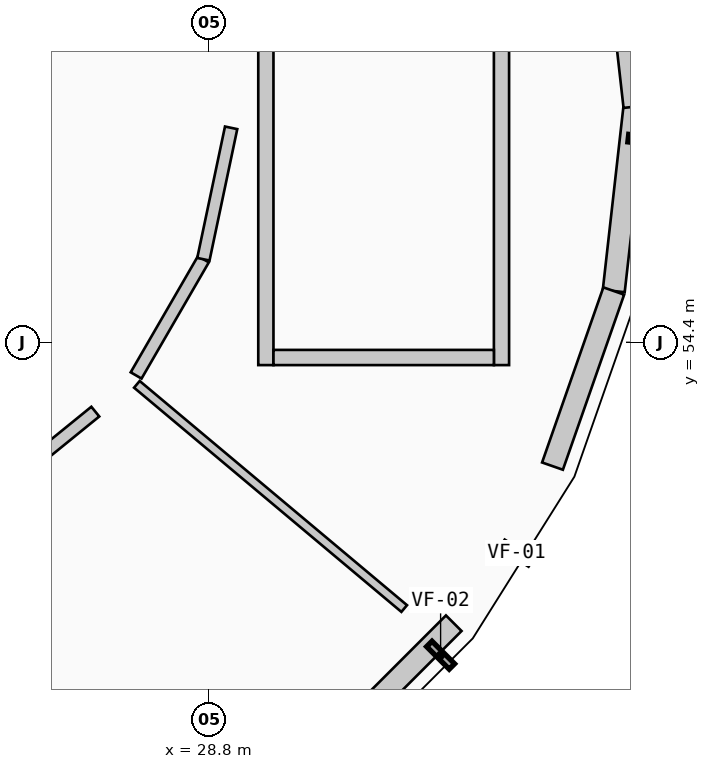
"""IFC4 building model, lengths in metres.
Left out: names, types, materials, properties, quantities, classifications, styles, units other than length and angle.
Written with IfcOpenShell. Run it as: python <this file> out.ifc"""

import sys

from ifc_helpers import new_model, si_unit, direction, frame, frame_2d, origin, origin_2d, place, context, subcontext, project, spatial, rectangle, extrude, element, fill, save


model = new_model("IFC4")
c1 = context("Model", 3, precision=1e-05, world=origin(), true_north=direction((0.0, 1.0)))
c2 = subcontext(c1, "Body", "Model", "MODEL_VIEW")
j1 = project(units=[si_unit("LENGTHUNIT", "METRE"), si_unit("PLANEANGLEUNIT", "RADIAN")], contexts=[c1])
p1 = place(None, origin())
s1 = spatial("IfcSite", under=j1, at=p1, CompositionType="ELEMENT")
p2 = place(p1, origin())
s2 = spatial("IfcBuilding", under=s1, at=p2, CompositionType="ELEMENT")
p3 = place(p2, frame((0.0, 0.0, 4.55)))
s3 = spatial("IfcBuildingStorey", under=s2, at=p3, CompositionType="ELEMENT", Elevation=4.55)
for number, where, z_axis, x_axis in (
    (1, (33.88, 57.5, 0.0), (0.0, 0.0, 1.0), (1.0, 0.0, 0.0)),
    (2, (32.852, 52.996, 0.0), (0.0, 0.0, 1.0), (1.0, 0.0, 0.0)),
    (3, (27.46, 53.54, 0.0), (0.0, 0.0, 1.0), (1.0, 0.0, 0.0)),
):
    element("IfcColumn", number, at=place(p3, frame(where, z_axis=z_axis, x_axis=x_axis)), inside=s3, PredefinedType="COLUMN", context=c2, shape_type="SweptSolid", body=[
        extrude(rectangle(XDim=0.315, YDim=0.315, at=origin_2d()), origin(), (0.0, 0.0, 1.0), 4.2),
    ])
p4 = place(p3, frame((34.4, 57.5, 0.0), z_axis=(0.0, 0.0, 1.0), x_axis=(-0.111847873866, -0.993725340882, 0.0)))
e4 = element("IfcWall", 4, at=p4, inside=s3, PredefinedType="ELEMENTEDWALL", context=c2, shape_type="SweptSolid", body=[
    extrude(rectangle(XDim=2.44, YDim=0.29, at=frame_2d((1.22, 0.0))), origin(), (0.0, 0.0, 1.0), 3.314),
])
p5 = place(p3, frame((34.127, 55.075, 0.0), z_axis=(0.0, 0.0, 1.0), x_axis=(-0.330176659411, -0.943919156274, 0.0)))
e5 = element("IfcWall", 5, at=p5, inside=s3, PredefinedType="ELEMENTEDWALL", context=c2, shape_type="SweptSolid", body=[
    extrude(rectangle(XDim=2.441, YDim=0.29, at=frame_2d((1.22, 0.0))), origin(), (0.0, 0.0, 1.0), 3.314),
])
p6 = place(p5, frame((0.71, 0.0, 0.85)))
e6 = element("IfcOpeningElement", 6, at=p6, cuts=e5, PredefinedType="OPENING", context=c2, shape_type="SweptSolid", body=[
    extrude(rectangle(XDim=1.02, YDim=1.6, at=frame_2d((0.51, 0.8))), frame((0.0, 0.155, 0.0), z_axis=(0.0, -1.0, 0.0), x_axis=(1.0, 0.0, 0.0)), (0.0, 0.0, 1.0), 0.31),
])
p7 = place(p3, frame((32.022, 50.704, 0.0), z_axis=(0.0, 0.0, 1.0), x_axis=(-0.707106781187, -0.707106781187, 0.0)))
e7 = element("IfcWall", 7, at=p7, inside=s3, PredefinedType="ELEMENTEDWALL", context=c2, shape_type="SweptSolid", body=[
    extrude(rectangle(XDim=2.441, YDim=0.29, at=frame_2d((1.22, 0.0))), origin(), (0.0, 0.0, 1.0), 3.314),
])
p8 = place(p7, frame((0.695, 0.0, 0.85)))
e8 = element("IfcOpeningElement", 8, at=p8, cuts=e7, PredefinedType="OPENING", context=c2, shape_type="SweptSolid", body=[
    extrude(rectangle(XDim=1.05, YDim=1.35, at=frame_2d((0.525, 0.675))), frame((0.0, 0.155, 0.0), z_axis=(0.0, -1.0, 0.0), x_axis=(1.0, 0.0, 0.0)), (0.0, 0.0, 1.0), 0.31),
])
p9 = place(p3, frame((34.127, 59.925, 0.0), z_axis=(0.0, 0.0, 1.0), x_axis=(0.111847873866, -0.993725340882, 0.0)))
e9 = element("IfcWall", 9, at=p9, inside=s3, PredefinedType="ELEMENTEDWALL", context=c2, shape_type="SweptSolid", body=[
    extrude(rectangle(XDim=2.44, YDim=0.29, at=frame_2d((1.22, 0.0))), origin(), (0.0, 0.0, 1.0), 3.314),
])
p10 = place(p3, frame((29.55, 60.9, 0.0), z_axis=(0.0, 0.0, 1.0), x_axis=(0.0, -1.0, 0.0)))
e10 = element("IfcWall", 10, at=p10, inside=s3, PredefinedType="SHEAR", context=c2, shape_type="SweptSolid", body=[
    extrude(rectangle(XDim=6.8, YDim=0.2, at=frame_2d((3.4, 0.0))), origin(), (0.0, 0.0, 1.0), 3.96),
])
p11 = place(p10, frame((0.38, 0.0, 0.0)))
e11 = element("IfcOpeningElement", 11, at=p11, cuts=e10, PredefinedType="OPENING", context=c2, shape_type="SweptSolid", body=[
    extrude(rectangle(XDim=1.1, YDim=2.15, at=frame_2d((0.55, 1.075))), frame((0.0, 0.11, 0.0), z_axis=(0.0, -1.0, 0.0), x_axis=(1.0, 0.0, 0.0)), (0.0, 0.0, 1.0), 0.22),
])
p12 = place(p3, frame((32.65, 60.9, 0.0), z_axis=(0.0, 0.0, 1.0), x_axis=(0.0, -1.0, 0.0)))
e12 = element("IfcWall", 12, at=p12, inside=s3, PredefinedType="SHEAR", context=c2, shape_type="SweptSolid", body=[
    extrude(rectangle(XDim=6.8, YDim=0.2, at=frame_2d((3.4, 0.0))), origin(), (0.0, 0.0, 1.0), 3.96),
])
p13 = place(p3, frame((29.65, 54.2, 0.0), z_axis=(0.0, 0.0, 1.0), x_axis=(1.0, 0.0, 0.0)))
e13 = element("IfcWall", 13, at=p13, inside=s3, PredefinedType="SHEAR", context=c2, shape_type="SweptSolid", body=[
    extrude(rectangle(XDim=2.9, YDim=0.2, at=frame_2d((1.45, 0.0))), origin(), (0.0, 0.0, 1.0), 3.96),
])
p14 = place(p3, frame((27.853, 53.847, 0.0), z_axis=(0.0, 0.0, 1.0), x_axis=(0.766177182771, -0.64262938355, 0.0)))
e14 = element("IfcWall", 14, at=p14, inside=s3, PredefinedType="PARTITIONING", context=c2, shape_type="SweptSolid", body=[
    extrude(rectangle(XDim=4.59, YDim=0.115, at=frame_2d((2.295, 0.0))), origin(), (0.0, 0.0, 1.0), 3.279),
])
p15 = place(p3, frame((26.215, 52.602, 0.0), z_axis=(0.0, 0.0, 1.0), x_axis=(0.77622027024, 0.630461808572, 0.0)))
e15 = element("IfcWall", 15, at=p15, inside=s3, PredefinedType="PARTITIONING", context=c2, shape_type="SweptSolid", body=[
    extrude(rectangle(XDim=1.405, YDim=0.165, at=frame_2d((0.703, 0.0))), origin(), (0.0, 0.0, 1.0), 3.279),
])
p16 = place(p3, frame((27.843, 53.964, 0.0), z_axis=(0.0, 0.0, 1.0), x_axis=(0.500998134269, 0.865448363254, 0.0)))
e16 = element("IfcWall", 16, at=p16, inside=s3, PredefinedType="PARTITIONING", context=c2, shape_type="SweptSolid", body=[
    extrude(rectangle(XDim=1.767, YDim=0.165, at=frame_2d((0.883, 0.0))), origin(), (0.0, 0.0, 1.0), 3.279),
])
p17 = place(p16, frame((0.408, 0.0, 0.0)))
e17 = element("IfcOpeningElement", 17, at=p17, cuts=e16, PredefinedType="OPENING", context=c2, shape_type="SweptSolid", body=[
    extrude(rectangle(XDim=0.95, YDim=2.16, at=frame_2d((0.475, 1.08))), frame((0.0, 0.093, 0.0), z_axis=(0.0, -1.0, 0.0), x_axis=(1.0, 0.0, 0.0)), (0.0, 0.0, 1.0), 0.185),
])
p18 = place(p3, frame((28.728, 55.493, 0.0), z_axis=(0.0, 0.0, 1.0), x_axis=(0.206546592113, 0.978436766116, 0.0)))
e18 = element("IfcWall", 18, at=p18, inside=s3, PredefinedType="PARTITIONING", context=c2, shape_type="SweptSolid", body=[
    extrude(rectangle(XDim=1.767, YDim=0.165, at=frame_2d((0.884, 0.0))), origin(), (0.0, 0.0, 1.0), 3.279),
])
p19 = place(p6, origin())
e19 = element("IfcWindow", 19, at=p19, inside=s3, PartitioningType="SINGLE_PANEL", PredefinedType="WINDOW", context=c2, shape_type="SweptSolid", body=[
    extrude(rectangle(XDim=1.02, YDim=1.6, at=frame_2d((0.51, 0.8))), frame((0.0, 0.03, 0.0), z_axis=(0.0, -1.0, 0.0), x_axis=(1.0, 0.0, 0.0)), (0.0, 0.0, 1.0), 0.06),
])
fill(e6, e19)
p20 = place(p8, origin())
e20 = element("IfcWindow", 20, at=p20, inside=s3, PartitioningType="SINGLE_PANEL", PredefinedType="WINDOW", context=c2, shape_type="SweptSolid", body=[
    extrude(rectangle(XDim=1.05, YDim=1.35, at=frame_2d((0.525, 0.675))), frame((0.0, 0.03, 0.0), z_axis=(0.0, -1.0, 0.0), x_axis=(1.0, 0.0, 0.0)), (0.0, 0.0, 1.0), 0.06),
])
fill(e8, e20)
p21 = place(p17, origin())
e21 = element("IfcDoor", 21, at=p21, inside=s3, OperationType="SINGLE_SWING_RIGHT", PredefinedType="DOOR", context=c2, shape_type="SweptSolid", body=[
    extrude(rectangle(XDim=0.95, YDim=2.16, at=frame_2d((0.475, 1.08))), frame((0.0, 0.025, 0.0), z_axis=(0.0, -1.0, 0.0), x_axis=(1.0, 0.0, 0.0)), (0.0, 0.0, 1.0), 0.05),
])
fill(e17, e21)
save(model, sys.argv[1])
